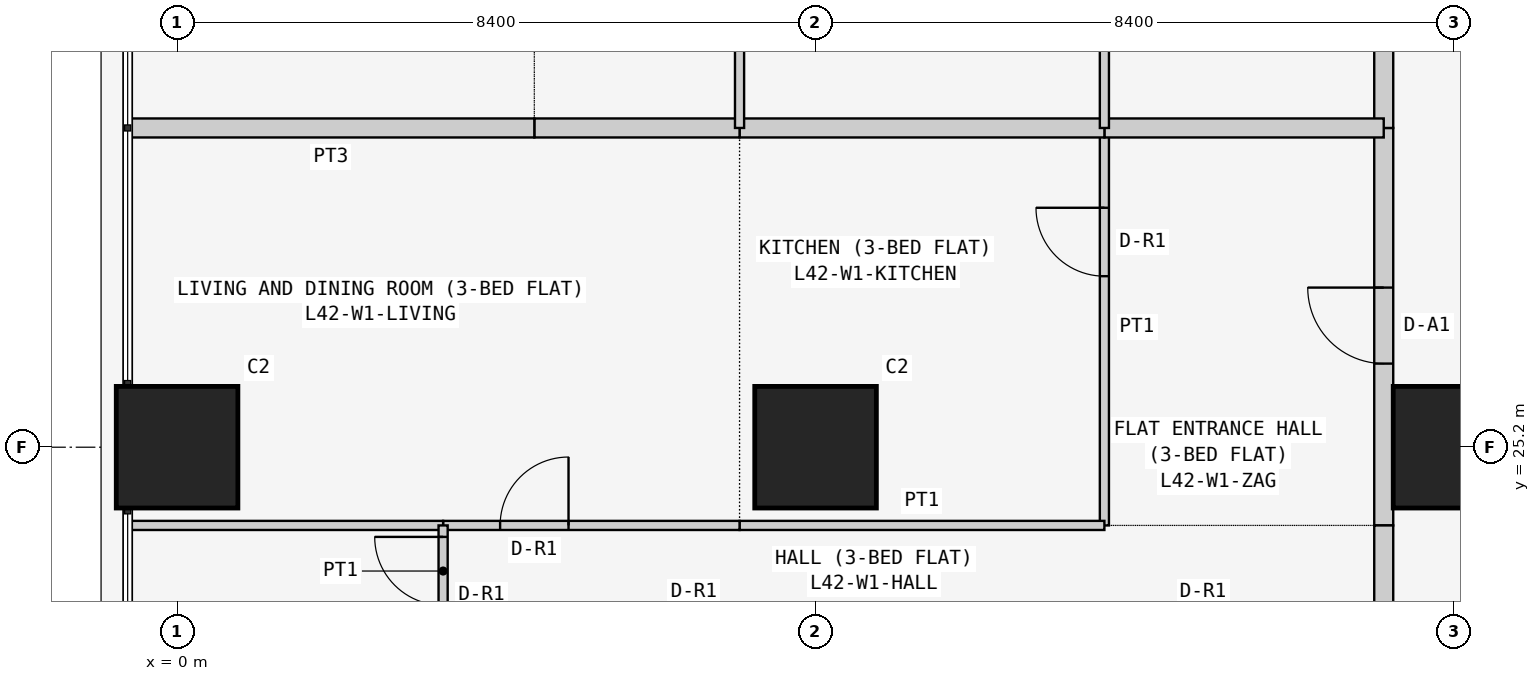
"""IFC4 building model, lengths in metres.
Left out: names, types, materials, properties, quantities, classifications, styles, units other than length and angle.
Written with IfcOpenShell. Run it as: python <this file> out.ifc"""

import sys

from ifc_helpers import new_model, si_unit, direction, frame, frame_2d, origin, origin_2d, place, context, subcontext, project, spatial, rectangle, extrude, element, fill, save


model = new_model("IFC4")
c1 = context("Model", 3, precision=1e-05, world=origin(), true_north=direction((0.0, 1.0)))
c2 = subcontext(c1, "Body", "Model", "MODEL_VIEW")
j1 = project(units=[si_unit("LENGTHUNIT", "METRE"), si_unit("PLANEANGLEUNIT", "RADIAN")], contexts=[c1])
p1 = place(None, origin())
s1 = spatial("IfcSite", under=j1, at=p1, CompositionType="ELEMENT")
p2 = place(p1, origin())
s2 = spatial("IfcBuilding", under=s1, at=p2, CompositionType="ELEMENT")
p3 = place(p2, frame((0.0, 0.0, 162.9)))
s3 = spatial("IfcBuildingStorey", under=s2, at=p3, CompositionType="ELEMENT", Elevation=162.9)
for number, where, z_axis, x_axis in (
    (1, (0.0, 25.2, 0.0), (0.0, 0.0, 1.0), (1.0, 0.0, 0.0)),
    (2, (8.4, 25.2, 0.0), (0.0, 0.0, 1.0), (1.0, 0.0, 0.0)),
    (3, (16.8, 25.2, 0.0), (0.0, 0.0, 1.0), (1.0, 0.0, 0.0)),
):
    element("IfcColumn", number, at=place(p3, frame(where, z_axis=z_axis, x_axis=x_axis)), inside=s3, PredefinedType="COLUMN", context=c2, shape_type="SweptSolid", body=[
        extrude(rectangle(XDim=1.6, YDim=1.6, at=origin_2d()), origin(), (0.0, 0.0, 1.0), 3.6),
    ])
p4 = place(p3, frame((15.875, 24.171, 0.0), z_axis=(0.0, 0.0, 1.0), x_axis=(0.0, 1.0, 0.0)))
e4 = element("IfcWall", 4, at=p4, inside=s3, PredefinedType="PARTITIONING", context=c2, shape_type="SweptSolid", body=[
    extrude(rectangle(XDim=5.229, YDim=0.25, at=frame_2d((2.615, 0.0))), origin(), (0.0, 0.0, 1.0), 3.45),
])
p5 = place(p4, frame((2.129, 0.0, 0.0)))
e5 = element("IfcOpeningElement", 5, at=p5, cuts=e4, PredefinedType="OPENING", context=c2, shape_type="SweptSolid", body=[
    extrude(rectangle(XDim=1.0, YDim=2.1, at=frame_2d((0.5, 1.05))), frame((0.0, 0.135, 0.0), z_axis=(0.0, -1.0, 0.0), x_axis=(1.0, 0.0, 0.0)), (0.0, 0.0, 1.0), 0.27),
])
p6 = place(p3, frame((15.875, 22.971, 0.0), z_axis=(0.0, 0.0, 1.0), x_axis=(0.0, 1.0, 0.0)))
e6 = element("IfcWall", 6, at=p6, inside=s3, PredefinedType="PARTITIONING", context=c2, shape_type="SweptSolid", body=[
    extrude(rectangle(XDim=1.2, YDim=0.25, at=frame_2d((0.6, 0.0))), origin(), (0.0, 0.0, 1.0), 3.45),
])
p7 = place(p3, frame((15.875, 29.4, 0.0), z_axis=(0.0, 0.0, 1.0), x_axis=(0.0, 1.0, 0.0)))
e7 = element("IfcWall", 7, at=p7, inside=s3, PredefinedType="PARTITIONING", context=c2, shape_type="SweptSolid", body=[
    extrude(rectangle(XDim=5.229, YDim=0.25, at=frame_2d((2.615, 0.0))), origin(), (0.0, 0.0, 1.0), 3.45),
])
p8 = place(p7, frame((2.1, 0.0, 0.0)))
e8 = element("IfcOpeningElement", 8, at=p8, cuts=e7, PredefinedType="OPENING", context=c2, shape_type="SweptSolid", body=[
    extrude(rectangle(XDim=1.0, YDim=2.1, at=frame_2d((0.5, 1.05))), frame((0.0, 0.135, 0.0), z_axis=(0.0, -1.0, 0.0), x_axis=(1.0, 0.0, 0.0)), (0.0, 0.0, 1.0), 0.27),
])
p9 = place(p3, frame((12.2, 29.4, 0.0), z_axis=(0.0, 0.0, 1.0), x_axis=(0.0, -1.0, 0.0)))
e9 = element("IfcWall", 9, at=p9, inside=s3, PredefinedType="PARTITIONING", context=c2, shape_type="SweptSolid", body=[
    extrude(rectangle(XDim=5.229, YDim=0.12, at=frame_2d((2.615, 0.0))), origin(), (0.0, 0.0, 1.0), 3.45),
])
p10 = place(p9, frame((1.05, 0.0, 0.0)))
e10 = element("IfcOpeningElement", 10, at=p10, cuts=e9, PredefinedType="OPENING", context=c2, shape_type="SweptSolid", body=[
    extrude(rectangle(XDim=0.9, YDim=2.1, at=frame_2d((0.45, 1.05))), frame((0.0, 0.07, 0.0), z_axis=(0.0, -1.0, 0.0), x_axis=(1.0, 0.0, 0.0)), (0.0, 0.0, 1.0), 0.14),
])
p11 = place(p3, frame((15.875, 29.4, 0.0), z_axis=(0.0, 0.0, 1.0), x_axis=(-1.0, 0.0, 0.0)))
e11 = element("IfcWall", 11, at=p11, inside=s3, PredefinedType="PARTITIONING", context=c2, shape_type="SweptSolid", body=[
    extrude(rectangle(XDim=3.675, YDim=0.25, at=frame_2d((1.837, 0.0))), origin(), (0.0, 0.0, 1.0), 3.45),
])
p12 = place(p3, frame((7.4, 24.171, 0.0), z_axis=(0.0, 0.0, 1.0), x_axis=(1.0, 0.0, 0.0)))
e12 = element("IfcWall", 12, at=p12, inside=s3, PredefinedType="PARTITIONING", context=c2, shape_type="SweptSolid", body=[
    extrude(rectangle(XDim=4.8, YDim=0.12, at=frame_2d((2.4, 0.0))), origin(), (0.0, 0.0, 1.0), 3.45),
])
p13 = place(p3, frame((12.2, 29.4, 0.0), z_axis=(0.0, 0.0, 1.0), x_axis=(-1.0, 0.0, 0.0)))
e13 = element("IfcWall", 13, at=p13, inside=s3, PredefinedType="PARTITIONING", context=c2, shape_type="SweptSolid", body=[
    extrude(rectangle(XDim=4.8, YDim=0.25, at=frame_2d((2.4, 0.0))), origin(), (0.0, 0.0, 1.0), 3.45),
])
p14 = place(p3, frame((3.5, 24.171, 0.0), z_axis=(0.0, 0.0, 1.0), x_axis=(1.0, 0.0, 0.0)))
e14 = element("IfcWall", 14, at=p14, inside=s3, PredefinedType="PARTITIONING", context=c2, shape_type="SweptSolid", body=[
    extrude(rectangle(XDim=3.9, YDim=0.12, at=frame_2d((1.95, 0.0))), origin(), (0.0, 0.0, 1.0), 3.45),
])
p15 = place(p14, frame((0.75, 0.0, 0.0)))
e15 = element("IfcOpeningElement", 15, at=p15, cuts=e14, PredefinedType="OPENING", context=c2, shape_type="SweptSolid", body=[
    extrude(rectangle(XDim=0.9, YDim=2.1, at=frame_2d((0.45, 1.05))), frame((0.0, 0.07, 0.0), z_axis=(0.0, -1.0, 0.0), x_axis=(1.0, 0.0, 0.0)), (0.0, 0.0, 1.0), 0.14),
])
p16 = place(p3, frame((-0.65, 24.171, 0.0), z_axis=(0.0, 0.0, 1.0), x_axis=(1.0, 0.0, 0.0)))
e16 = element("IfcWall", 16, at=p16, inside=s3, PredefinedType="PARTITIONING", context=c2, shape_type="SweptSolid", body=[
    extrude(rectangle(XDim=4.15, YDim=0.12, at=frame_2d((2.075, 0.0))), origin(), (0.0, 0.0, 1.0), 3.45),
])
p17 = place(p3, frame((7.4, 29.4, 0.0), z_axis=(0.0, 0.0, 1.0), x_axis=(-1.0, 0.0, 0.0)))
e17 = element("IfcWall", 17, at=p17, inside=s3, PredefinedType="PARTITIONING", context=c2, shape_type="SweptSolid", body=[
    extrude(rectangle(XDim=2.7, YDim=0.25, at=frame_2d((1.35, 0.0))), origin(), (0.0, 0.0, 1.0), 3.45),
])
p18 = place(p3, frame((4.7, 29.4, 0.0), z_axis=(0.0, 0.0, 1.0), x_axis=(-1.0, 0.0, 0.0)))
e18 = element("IfcWall", 18, at=p18, inside=s3, PredefinedType="PARTITIONING", context=c2, shape_type="SweptSolid", body=[
    extrude(rectangle(XDim=5.35, YDim=0.25, at=frame_2d((2.675, 0.0))), origin(), (0.0, 0.0, 1.0), 3.45),
])
p19 = place(p3, frame((3.5, 24.171, 0.0), z_axis=(0.0, 0.0, 1.0), x_axis=(0.0, -1.0, 0.0)))
e19 = element("IfcWall", 19, at=p19, inside=s3, PredefinedType="PARTITIONING", context=c2, shape_type="SweptSolid", body=[
    extrude(rectangle(XDim=1.2, YDim=0.12, at=frame_2d((0.6, 0.0))), origin(), (0.0, 0.0, 1.0), 3.45),
])
p20 = place(p19, frame((0.151, 0.0, 0.0)))
e20 = element("IfcOpeningElement", 20, at=p20, cuts=e19, PredefinedType="OPENING", context=c2, shape_type="SweptSolid", body=[
    extrude(rectangle(XDim=0.9, YDim=2.1, at=frame_2d((0.45, 1.05))), frame((0.0, 0.07, 0.0), z_axis=(0.0, -1.0, 0.0), x_axis=(1.0, 0.0, 0.0)), (0.0, 0.0, 1.0), 0.14),
])
for number, where, z_axis, x_axis in (
    (21, (12.2, 29.4, 0.0), (0.0, 0.0, 1.0), (0.0, 1.0, 0.0)),
    (22, (7.4, 29.4, 0.0), (0.0, 0.0, 1.0), (0.0, 1.0, 0.0)),
):
    element("IfcWall", number, at=place(p3, frame(where, z_axis=z_axis, x_axis=x_axis)), inside=s3, PredefinedType="PARTITIONING", context=c2, shape_type="SweptSolid", body=[
        extrude(rectangle(XDim=5.229, YDim=0.12, at=frame_2d((2.615, 0.0))), origin(), (0.0, 0.0, 1.0), 3.45),
    ])
p21 = place(p5, origin())
e23 = element("IfcDoor", 23, at=p21, inside=s3, OperationType="SINGLE_SWING_RIGHT", PredefinedType="DOOR", context=c2, shape_type="SweptSolid", body=[
    extrude(rectangle(XDim=1.0, YDim=2.1, at=frame_2d((0.5, 1.05))), frame((0.0, 0.025, 0.0), z_axis=(0.0, -1.0, 0.0), x_axis=(1.0, 0.0, 0.0)), (0.0, 0.0, 1.0), 0.05),
])
fill(e5, e23)
p22 = place(p10, frame((0.9, 0.0, 0.0), z_axis=(0.0, 0.0, 1.0), x_axis=(-1.0, 0.0, 0.0)))
e24 = element("IfcDoor", 24, at=p22, inside=s3, OperationType="SINGLE_SWING_RIGHT", PredefinedType="DOOR", context=c2, shape_type="SweptSolid", body=[
    extrude(rectangle(XDim=0.9, YDim=2.1, at=frame_2d((0.45, 1.05))), frame((0.0, 0.025, 0.0), z_axis=(0.0, -1.0, 0.0), x_axis=(1.0, 0.0, 0.0)), (0.0, 0.0, 1.0), 0.05),
])
fill(e10, e24)
p23 = place(p15, origin())
e25 = element("IfcDoor", 25, at=p23, inside=s3, OperationType="SINGLE_SWING_RIGHT", PredefinedType="DOOR", context=c2, shape_type="SweptSolid", body=[
    extrude(rectangle(XDim=0.9, YDim=2.1, at=frame_2d((0.45, 1.05))), frame((0.0, 0.025, 0.0), z_axis=(0.0, -1.0, 0.0), x_axis=(1.0, 0.0, 0.0)), (0.0, 0.0, 1.0), 0.05),
])
fill(e15, e25)
p24 = place(p20, frame((0.9, 0.0, 0.0), z_axis=(0.0, 0.0, 1.0), x_axis=(-1.0, 0.0, 0.0)))
e26 = element("IfcDoor", 26, at=p24, inside=s3, OperationType="SINGLE_SWING_RIGHT", PredefinedType="DOOR", context=c2, shape_type="SweptSolid", body=[
    extrude(rectangle(XDim=0.9, YDim=2.1, at=frame_2d((0.45, 1.05))), frame((0.0, 0.025, 0.0), z_axis=(0.0, -1.0, 0.0), x_axis=(1.0, 0.0, 0.0)), (0.0, 0.0, 1.0), 0.05),
])
fill(e20, e26)
save(model, sys.argv[1])
